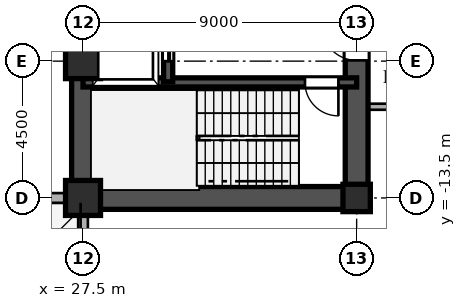
"""IFC4 building model, lengths in metres.
Left out: names, types, materials, properties, quantities, classifications, styles, units other than length and angle.
Written with IfcOpenShell. Run it as: python <this file> out.ifc"""

import sys

from ifc_helpers import new_model, si_unit, direction, frame, frame_2d, origin, origin_2d, place, context, subcontext, project, spatial, rectangle, hollow_rectangle, i_section, extrude, source, transform, mapped, element, fill, save


model = new_model("IFC4")
c1 = context("Model", 3, precision=1e-05, world=origin(), true_north=direction((0.0, 1.0)))
c2 = subcontext(c1, "Body", "Model", "MODEL_VIEW")
j1 = project(units=[si_unit("LENGTHUNIT", "METRE"), si_unit("PLANEANGLEUNIT", "RADIAN")], contexts=[c1])
p1 = place(None, origin())
s1 = spatial("IfcSite", under=j1, at=p1, CompositionType="ELEMENT")
p2 = place(p1, origin())
s2 = spatial("IfcBuilding", under=s1, at=p2, CompositionType="ELEMENT")
p3 = place(p2, frame((0.0, 0.0, 14.4)))
s3 = spatial("IfcBuildingStorey", under=s2, at=p3, CompositionType="ELEMENT", Elevation=14.4)
m1 = source(origin(), c2, "Body", "SweptSolid", [
    extrude(hollow_rectangle(XDim=1.15, YDim=1.15, WallThickness=0.048, at=origin_2d()), origin(), (0.0, 0.0, 1.0), 4.5),
])
for number, where, z_axis, x_axis in (
    (1, (27.5, -13.5, 0.0), (0.0, 0.0, 1.0), (1.0, 0.0, 0.0)),
    (2, (27.5, -9.0, 0.0), (0.0, 0.0, 1.0), (1.0, 0.0, 0.0)),
):
    element("IfcColumn", number, at=place(p3, frame(where, z_axis=z_axis, x_axis=x_axis)), inside=s3, PredefinedType="COLUMN", context=c2, shape_type="MappedRepresentation", body=[
        mapped(m1, transform((0.0, 0.0, 0.0), scale=1.0)),
    ])
m2 = source(origin(), c2, "Body", "SweptSolid", [
    extrude(i_section(OverallWidth=0.9, OverallDepth=0.9, WebThickness=0.036, FlangeThickness=0.055, at=origin_2d()), origin(), (0.0, 0.0, 1.0), 4.5),
])
p4 = place(p3, frame((36.5, -13.5, 0.0), z_axis=(0.0, 0.0, 1.0), x_axis=(1.0, 0.0, 0.0)))
e3 = element("IfcColumn", 3, at=p4, inside=s3, PredefinedType="COLUMN", context=c2, shape_type="MappedRepresentation", body=[
    mapped(m2, transform((0.0, 0.0, 0.0), scale=1.0)),
])
p5 = place(p3, frame((-27.46, -13.5, 0.0), z_axis=(0.0, 0.0, 1.0), x_axis=(1.0, 0.0, 0.0)))
e4 = element("IfcWall", 4, at=p5, inside=s3, PredefinedType="SOLIDWALL", context=c2, shape_type="SweptSolid", body=[
    extrude(rectangle(XDim=54.92, YDim=0.32, at=frame_2d((27.46, 0.0))), origin(), (0.0, 0.0, 1.0), 4.28),
])
p6 = place(p5, frame((15.8, 0.0, 0.0)))
e5 = element("IfcOpeningElement", 5, at=p6, cuts=e4, PredefinedType="OPENING", context=c2, shape_type="SweptSolid", body=[
    extrude(rectangle(XDim=1.8, YDim=2.3, at=frame_2d((0.9, 1.15))), frame((0.0, 0.17, 0.0), z_axis=(0.0, -1.0, 0.0), x_axis=(1.0, 0.0, 0.0)), (0.0, 0.0, 1.0), 0.34),
])
p7 = place(p5, frame((18.8, 0.0, 0.0)))
e6 = element("IfcOpeningElement", 6, at=p7, cuts=e4, PredefinedType="OPENING", context=c2, shape_type="SweptSolid", body=[
    extrude(rectangle(XDim=1.8, YDim=2.3, at=frame_2d((0.9, 1.15))), frame((0.0, 0.17, 0.0), z_axis=(0.0, -1.0, 0.0), x_axis=(1.0, 0.0, 0.0)), (0.0, 0.0, 1.0), 0.34),
])
p8 = place(p5, frame((4.5, 0.0, 0.8)))
e7 = element("IfcOpeningElement", 7, at=p8, cuts=e4, PredefinedType="OPENING", context=c2, shape_type="SweptSolid", body=[
    extrude(rectangle(XDim=1.65, YDim=1.85, at=frame_2d((0.825, 0.925))), frame((0.0, 0.17, 0.0), z_axis=(0.0, -1.0, 0.0), x_axis=(1.0, 0.0, 0.0)), (0.0, 0.0, 1.0), 0.34),
])
p9 = place(p5, frame((25.0, 0.0, 0.8)))
e8 = element("IfcOpeningElement", 8, at=p9, cuts=e4, PredefinedType="OPENING", context=c2, shape_type="SweptSolid", body=[
    extrude(rectangle(XDim=1.65, YDim=1.85, at=frame_2d((0.825, 0.925))), frame((0.0, 0.17, 0.0), z_axis=(0.0, -1.0, 0.0), x_axis=(1.0, 0.0, 0.0)), (0.0, 0.0, 1.0), 0.34),
])
p10 = place(p5, frame((46.42, 0.0, 0.8)))
e9 = element("IfcOpeningElement", 9, at=p10, cuts=e4, PredefinedType="OPENING", context=c2, shape_type="SweptSolid", body=[
    extrude(rectangle(XDim=1.65, YDim=1.85, at=frame_2d((0.825, 0.925))), frame((0.0, 0.17, 0.0), z_axis=(0.0, -1.0, 0.0), x_axis=(1.0, 0.0, 0.0)), (0.0, 0.0, 1.0), 0.34),
])
p11 = place(p3, frame((27.5, -23.95, 0.0), z_axis=(0.0, 0.0, 1.0), x_axis=(0.0, 1.0, 0.0)))
e10 = element("IfcWall", 10, at=p11, inside=s3, PredefinedType="SOLIDWALL", context=c2, shape_type="SweptSolid", body=[
    extrude(rectangle(XDim=10.4, YDim=0.32, at=frame_2d((5.2, 0.0))), origin(), (0.0, 0.0, 1.0), 2.78),
])
p12 = place(p3, frame((30.537, -26.985, 0.0), z_axis=(0.0, 0.0, 1.0), x_axis=(0.926944846568, 0.375197616492, 0.0)))
e11 = element("IfcWall", 11, at=p12, inside=s3, PredefinedType="SOLIDWALL", context=c2, shape_type="SweptSolid", body=[
    extrude(rectangle(XDim=45.23, YDim=0.32, at=frame_2d((22.615, 0.0))), origin(), (0.0, 0.0, 1.0), 4.28),
])
p13 = place(p12, frame((6.0, 0.0, 0.85)))
e12 = element("IfcOpeningElement", 12, at=p13, cuts=e11, PredefinedType="OPENING", context=c2, shape_type="SweptSolid", body=[
    extrude(rectangle(XDim=1.8, YDim=2.0, at=frame_2d((0.9, 1.0))), frame((0.0, 0.17, 0.0), z_axis=(0.0, -1.0, 0.0), x_axis=(1.0, 0.0, 0.0)), (0.0, 0.0, 1.0), 0.34),
])
p14 = place(p12, frame((36.23, 0.0, 0.85)))
e13 = element("IfcOpeningElement", 13, at=p14, cuts=e11, PredefinedType="OPENING", context=c2, shape_type="SweptSolid", body=[
    extrude(rectangle(XDim=1.8, YDim=2.0, at=frame_2d((0.9, 1.0))), frame((0.0, 0.17, 0.0), z_axis=(0.0, -1.0, 0.0), x_axis=(1.0, 0.0, 0.0)), (0.0, 0.0, 1.0), 0.34),
])
p15 = place(p3, frame((27.5, -13.5, 0.0), z_axis=(0.0, 0.0, 1.0), x_axis=(0.0, 1.0, 0.0)))
e14 = element("IfcWall", 14, at=p15, inside=s3, PredefinedType="SHEAR", context=c2, shape_type="SweptSolid", body=[
    extrude(rectangle(XDim=12.2, YDim=0.75, at=frame_2d((6.1, 0.0))), origin(), (0.0, 0.0, 1.0), 4.28),
])
p16 = place(p3, frame((27.5, -13.5, 0.0), z_axis=(0.0, 0.0, 1.0), x_axis=(1.0, 0.0, 0.0)))
e15 = element("IfcWall", 15, at=p16, inside=s3, PredefinedType="SHEAR", context=c2, shape_type="SweptSolid", body=[
    extrude(rectangle(XDim=9.0, YDim=0.75, at=frame_2d((4.5, 0.0))), origin(), (0.0, 0.0, 1.0), 4.28),
])
p17 = place(p3, frame((36.5, -13.65, 0.0), z_axis=(0.0, 0.0, 1.0), x_axis=(0.0, 1.0, 0.0)))
e16 = element("IfcWall", 16, at=p17, inside=s3, PredefinedType="SHEAR", context=c2, shape_type="SweptSolid", body=[
    extrude(rectangle(XDim=7.15, YDim=0.75, at=frame_2d((3.575, 0.0))), origin(), (0.0, 0.0, 1.0), 4.28),
])
p18 = place(p17, frame((4.675, 0.0, 0.0)))
e17 = element("IfcOpeningElement", 17, at=p18, cuts=e16, PredefinedType="OPENING", context=c2, shape_type="SweptSolid", body=[
    extrude(rectangle(XDim=1.15, YDim=2.2, at=frame_2d((0.575, 1.1))), frame((0.0, 0.385, 0.0), z_axis=(0.0, -1.0, 0.0), x_axis=(1.0, 0.0, 0.0)), (0.0, 0.0, 1.0), 0.77),
])
p19 = place(p3, frame((27.5, -9.7, 0.0), z_axis=(0.0, 0.0, 1.0), x_axis=(1.0, 0.0, 0.0)))
e18 = element("IfcWall", 18, at=p19, inside=s3, PredefinedType="SHEAR", context=c2, shape_type="SweptSolid", body=[
    extrude(rectangle(XDim=9.0, YDim=0.3, at=frame_2d((4.5, 0.0))), origin(), (0.0, 0.0, 1.0), 4.28),
])
p20 = place(p19, frame((7.3, 0.0, 0.0)))
e19 = element("IfcOpeningElement", 19, at=p20, cuts=e18, PredefinedType="OPENING", context=c2, shape_type="SweptSolid", body=[
    extrude(rectangle(XDim=1.1, YDim=2.2, at=frame_2d((0.55, 1.1))), frame((0.0, 0.16, 0.0), z_axis=(0.0, -1.0, 0.0), x_axis=(1.0, 0.0, 0.0)), (0.0, 0.0, 1.0), 0.32),
])
p21 = place(p3, frame((30.3, -9.68, 0.0), z_axis=(0.0, 0.0, 1.0), x_axis=(0.0, 1.0, 0.0)))
e20 = element("IfcWall", 20, at=p21, inside=s3, PredefinedType="SHEAR", context=c2, shape_type="SweptSolid", body=[
    extrude(rectangle(XDim=2.56, YDim=0.3, at=frame_2d((1.28, 0.0))), origin(), (0.0, 0.0, 1.0), 4.28),
])
p22 = place(p21, frame((0.68, 0.0, 0.0)))
e21 = element("IfcOpeningElement", 21, at=p22, cuts=e20, PredefinedType="OPENING", context=c2, shape_type="SweptSolid", body=[
    extrude(rectangle(XDim=1.2, YDim=2.25, at=frame_2d((0.6, 1.125))), frame((0.0, 0.16, 0.0), z_axis=(0.0, -1.0, 0.0), x_axis=(1.0, 0.0, 0.0)), (0.0, 0.0, 1.0), 0.32),
])
p23 = place(p3, frame((36.88, -10.5, 0.0), z_axis=(0.0, 0.0, 1.0), x_axis=(1.0, 0.0, 0.0)))
e22 = element("IfcWall", 22, at=p23, inside=s3, PredefinedType="PARTITIONING", context=c2, shape_type="SweptSolid", body=[
    extrude(rectangle(XDim=2.035, YDim=0.2, at=frame_2d((1.018, 0.0))), origin(), (0.0, 0.0, 1.0), 4.28),
])
m3 = source(origin(), c2, "Body", "SweptSolid", [
    extrude(rectangle(XDim=1.15, YDim=2.2, at=frame_2d((0.575, 1.1))), frame((0.0, 0.025, 0.0), z_axis=(0.0, -1.0, 0.0), x_axis=(1.0, 0.0, 0.0)), (0.0, 0.0, 1.0), 0.05),
])
p24 = place(p18, origin())
e23 = element("IfcDoor", 23, at=p24, inside=s3, OperationType="SINGLE_SWING_RIGHT", PredefinedType="DOOR", context=c2, shape_type="MappedRepresentation", body=[
    mapped(m3, transform((0.0, 0.0, 0.0), scale=1.0)),
])
fill(e17, e23)
m4 = source(origin(), c2, "Body", "SweptSolid", [
    extrude(rectangle(XDim=1.1, YDim=2.2, at=frame_2d((0.55, 1.1))), frame((0.0, 0.025, 0.0), z_axis=(0.0, -1.0, 0.0), x_axis=(1.0, 0.0, 0.0)), (0.0, 0.0, 1.0), 0.05),
])
p25 = place(p20, frame((1.1, 0.0, 0.0), z_axis=(0.0, 0.0, 1.0), x_axis=(-1.0, 0.0, 0.0)))
e24 = element("IfcDoor", 24, at=p25, inside=s3, OperationType="SINGLE_SWING_RIGHT", PredefinedType="DOOR", context=c2, shape_type="MappedRepresentation", body=[
    mapped(m4, transform((0.0, 0.0, 0.0), scale=1.0)),
])
fill(e19, e24)
m5 = source(origin(), c2, "Body", "SweptSolid", [
    extrude(rectangle(XDim=1.2, YDim=2.25, at=frame_2d((0.6, 1.125))), frame((0.0, 0.025, 0.0), z_axis=(0.0, -1.0, 0.0), x_axis=(1.0, 0.0, 0.0)), (0.0, 0.0, 1.0), 0.05),
])
p26 = place(p22, origin())
e25 = element("IfcDoor", 25, at=p26, inside=s3, OperationType="DOUBLE_DOOR_SLIDING", PredefinedType="DOOR", context=c2, shape_type="MappedRepresentation", body=[
    mapped(m5, transform((0.0, 0.0, 0.0), scale=1.0)),
])
fill(e21, e25)
save(model, sys.argv[1])
